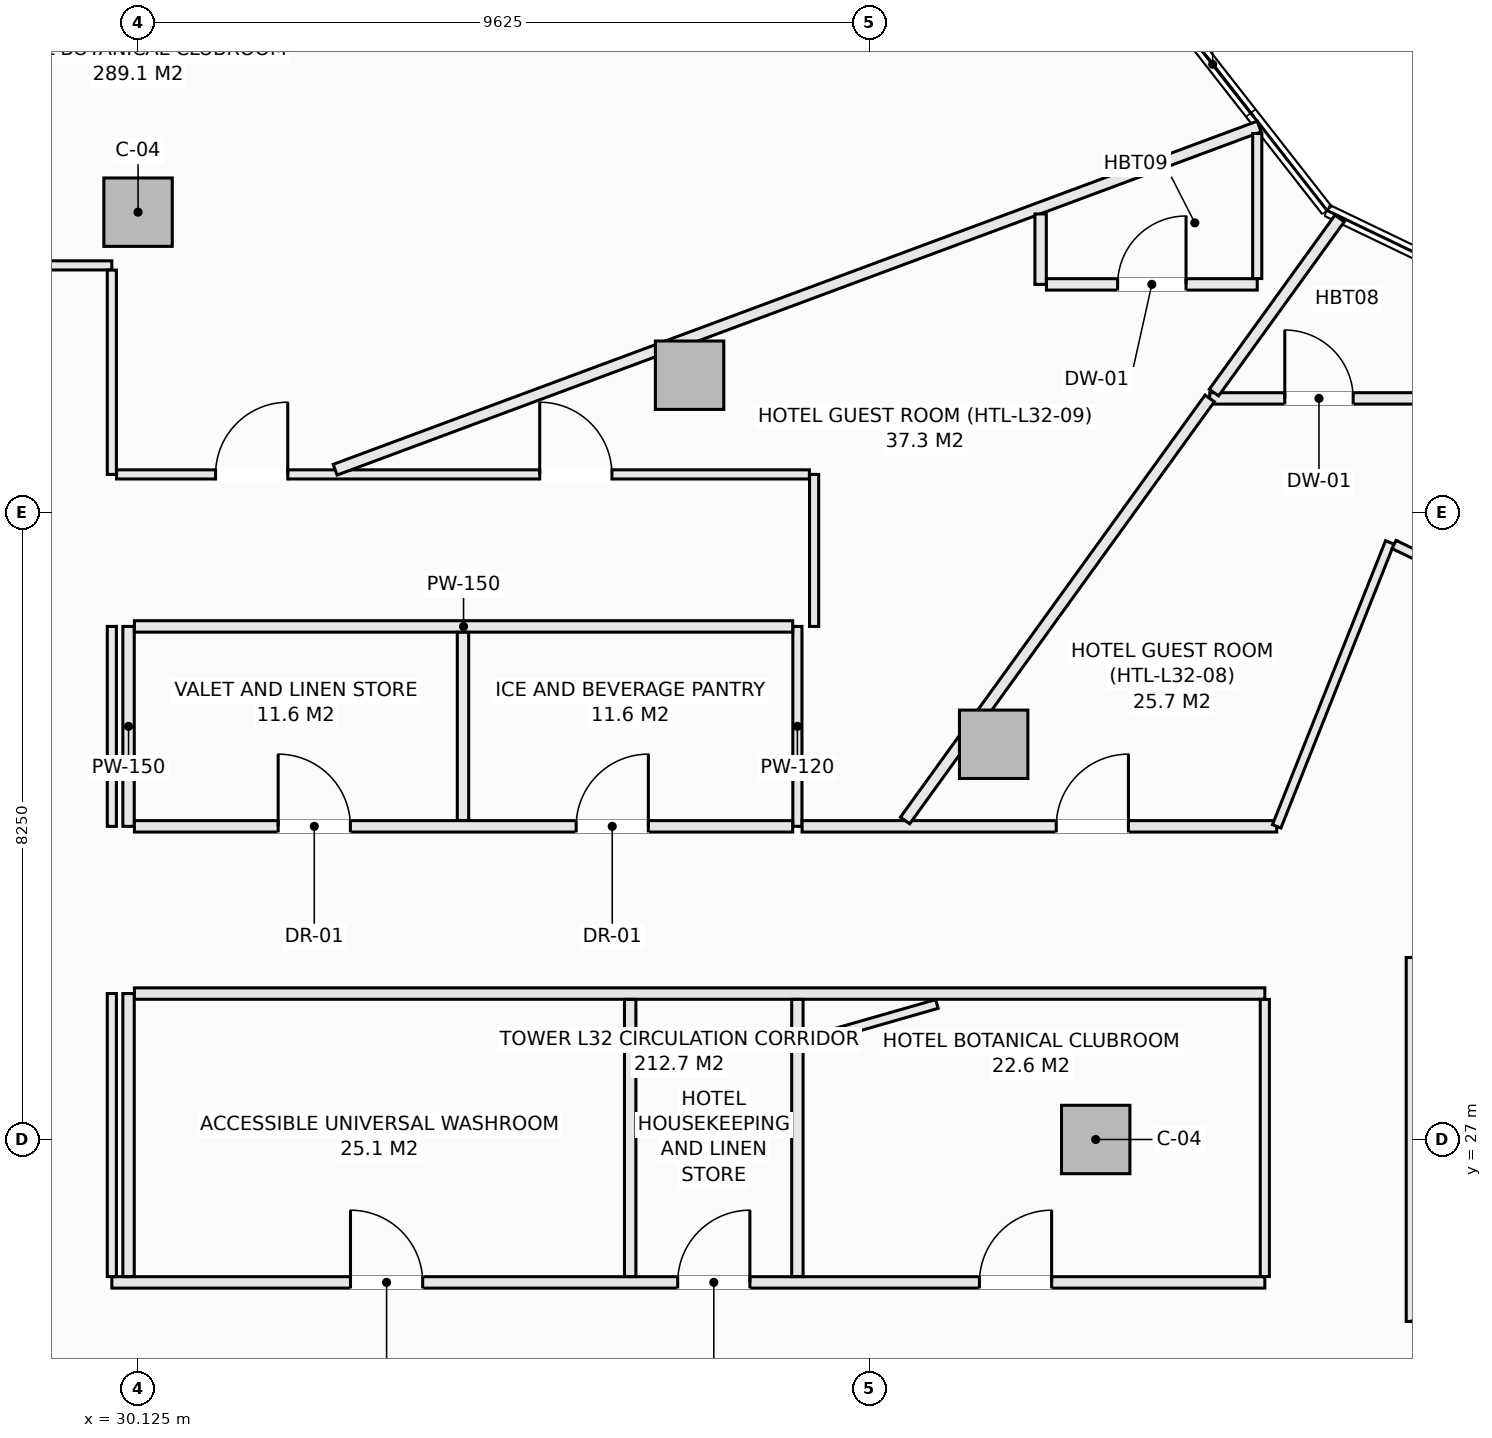
"""IFC4 building model, lengths in metres.
Left out: names, types, materials, properties, quantities, classifications, styles, units other than length and angle.
Written with IfcOpenShell. Run it as: python <this file> out.ifc"""

import sys

from ifc_helpers import new_model, si_unit, direction, frame, frame_2d, origin, origin_2d, place, context, subcontext, project, spatial, rectangle, extrude, element, fill, save


model = new_model("IFC4")
c1 = context("Model", 3, precision=1e-05, world=origin(), true_north=direction((0.0, 1.0)))
c2 = subcontext(c1, "Body", "Model", "MODEL_VIEW")
j1 = project(units=[si_unit("LENGTHUNIT", "METRE"), si_unit("PLANEANGLEUNIT", "RADIAN")], contexts=[c1])
p1 = place(None, origin())
s1 = spatial("IfcSite", under=j1, at=p1, CompositionType="ELEMENT")
p2 = place(p1, origin())
s2 = spatial("IfcBuilding", under=s1, at=p2, CompositionType="ELEMENT")
p3 = place(p2, frame((0.0, 0.0, 129.1)))
s3 = spatial("IfcBuildingStorey", under=s2, at=p3, CompositionType="ELEMENT", Elevation=129.1)
for number, where, z_axis, x_axis in (
    (1, (42.725, 27.0, -0.27), (0.0, 0.0, 1.0), (1.0, 0.0, 0.0)),
    (2, (41.382, 32.199, -0.27), (0.0, 0.0, 1.0), (1.0, 0.0, 0.0)),
    (3, (37.382, 37.055, -0.27), (0.0, 0.0, 1.0), (1.0, 0.0, 0.0)),
    (4, (30.125, 39.2, -0.27), (0.0, 0.0, 1.0), (1.0, 0.0, 0.0)),
):
    element("IfcColumn", number, at=place(p3, frame(where, z_axis=z_axis, x_axis=x_axis)), inside=s3, PredefinedType="COLUMN", context=c2, shape_type="SweptSolid", body=[
        extrude(rectangle(XDim=0.9, YDim=0.9, at=origin_2d()), origin(), (0.0, 0.0, 1.0), 3.4),
    ])
p4 = place(p3, frame((29.78, 25.12, 0.0), z_axis=(0.0, 0.0, 1.0), x_axis=(1.0, 0.0, 0.0)))
e5 = element("IfcWall", 5, at=p4, inside=s3, PredefinedType="PARTITIONING", context=c2, shape_type="SweptSolid", body=[
    extrude(rectangle(XDim=15.17, YDim=0.15, at=frame_2d((7.585, 0.0))), origin(), (0.0, 0.0, 1.0), 3.13),
])
p5 = place(p4, frame((3.14, 0.0, 0.0)))
e6 = element("IfcOpeningElement", 6, at=p5, cuts=e5, PredefinedType="OPENING", context=c2, shape_type="SweptSolid", body=[
    extrude(rectangle(XDim=0.95, YDim=2.1, at=frame_2d((0.475, 1.05))), frame((0.0, 0.085, 0.0), z_axis=(0.0, -1.0, 0.0), x_axis=(1.0, 0.0, 0.0)), (0.0, 0.0, 1.0), 0.17),
])
p6 = place(p4, frame((7.445, 0.0, 0.0)))
e7 = element("IfcOpeningElement", 7, at=p6, cuts=e5, PredefinedType="OPENING", context=c2, shape_type="SweptSolid", body=[
    extrude(rectangle(XDim=0.95, YDim=2.1, at=frame_2d((0.475, 1.05))), frame((0.0, 0.085, 0.0), z_axis=(0.0, -1.0, 0.0), x_axis=(1.0, 0.0, 0.0)), (0.0, 0.0, 1.0), 0.17),
])
p7 = place(p4, frame((11.415, 0.0, 0.0)))
e8 = element("IfcOpeningElement", 8, at=p7, cuts=e5, PredefinedType="OPENING", context=c2, shape_type="SweptSolid", body=[
    extrude(rectangle(XDim=0.95, YDim=2.1, at=frame_2d((0.475, 1.05))), frame((0.0, 0.085, 0.0), z_axis=(0.0, -1.0, 0.0), x_axis=(1.0, 0.0, 0.0)), (0.0, 0.0, 1.0), 0.17),
])
p8 = place(p3, frame((30.0, 25.197, 0.0), z_axis=(0.0, 0.0, 1.0), x_axis=(0.0, 1.0, 0.0)))
e9 = element("IfcWall", 9, at=p8, inside=s3, PredefinedType="PARTITIONING", context=c2, shape_type="SweptSolid", body=[
    extrude(rectangle(XDim=3.723, YDim=0.15, at=frame_2d((1.861, 0.0))), origin(), (0.0, 0.0, 1.0), 3.13),
])
p9 = place(p3, frame((30.0, 31.12, 0.0), z_axis=(0.0, 0.0, 1.0), x_axis=(0.0, 1.0, 0.0)))
e10 = element("IfcWall", 10, at=p9, inside=s3, PredefinedType="PARTITIONING", context=c2, shape_type="SweptSolid", body=[
    extrude(rectangle(XDim=2.63, YDim=0.15, at=frame_2d((1.315, 0.0))), origin(), (0.0, 0.0, 1.0), 3.13),
])
p10 = place(p3, frame((30.077, 28.92, 0.0), z_axis=(0.0, 0.0, 1.0), x_axis=(1.0, 0.0, 0.0)))
e11 = element("IfcWall", 11, at=p10, inside=s3, PredefinedType="PARTITIONING", context=c2, shape_type="SweptSolid", body=[
    extrude(rectangle(XDim=14.873, YDim=0.15, at=frame_2d((7.437, 0.0))), origin(), (0.0, 0.0, 1.0), 3.13),
])
for number, where, z_axis, x_axis in (
    (12, (36.6, 25.197, 0.0), (0.0, 0.0, 1.0), (0.0, 1.0, 0.0)),
    (13, (38.8, 25.197, 0.0), (0.0, 0.0, 1.0), (0.0, 1.0, 0.0)),
):
    element("IfcWall", number, at=place(p3, frame(where, z_axis=z_axis, x_axis=x_axis)), inside=s3, PredefinedType="PARTITIONING", context=c2, shape_type="SweptSolid", body=[
        extrude(rectangle(XDim=3.646, YDim=0.15, at=frame_2d((1.823, 0.0))), origin(), (0.0, 0.0, 1.0), 3.13),
    ])
p11 = place(p3, frame((38.8, 31.12, 0.0), z_axis=(0.0, 0.0, 1.0), x_axis=(0.0, 1.0, 0.0)))
e14 = element("IfcWall", 14, at=p11, inside=s3, PredefinedType="PARTITIONING", context=c2, shape_type="SweptSolid", body=[
    extrude(rectangle(XDim=2.63, YDim=0.12, at=frame_2d((1.315, 0.0))), origin(), (0.0, 0.0, 1.0), 3.13),
])
p12 = place(p3, frame((30.077, 31.12, 0.0), z_axis=(0.0, 0.0, 1.0), x_axis=(1.0, 0.0, 0.0)))
e15 = element("IfcWall", 15, at=p12, inside=s3, PredefinedType="PARTITIONING", context=c2, shape_type="SweptSolid", body=[
    extrude(rectangle(XDim=8.661, YDim=0.15, at=frame_2d((4.331, 0.0))), origin(), (0.0, 0.0, 1.0), 3.13),
])
p13 = place(p12, frame((1.892, 0.0, 0.0)))
e16 = element("IfcOpeningElement", 16, at=p13, cuts=e15, PredefinedType="OPENING", context=c2, shape_type="SweptSolid", body=[
    extrude(rectangle(XDim=0.95, YDim=2.1, at=frame_2d((0.475, 1.05))), frame((0.0, 0.085, 0.0), z_axis=(0.0, -1.0, 0.0), x_axis=(1.0, 0.0, 0.0)), (0.0, 0.0, 1.0), 0.17),
])
p14 = place(p12, frame((5.812, 0.0, 0.0)))
e17 = element("IfcOpeningElement", 17, at=p14, cuts=e15, PredefinedType="OPENING", context=c2, shape_type="SweptSolid", body=[
    extrude(rectangle(XDim=0.95, YDim=2.1, at=frame_2d((0.475, 1.05))), frame((0.0, 0.085, 0.0), z_axis=(0.0, -1.0, 0.0), x_axis=(1.0, 0.0, 0.0)), (0.0, 0.0, 1.0), 0.17),
])
p15 = place(p3, frame((38.862, 31.12, 0.0), z_axis=(0.0, 0.0, 1.0), x_axis=(1.0, 0.0, 0.0)))
e18 = element("IfcWall", 18, at=p15, inside=s3, PredefinedType="PARTITIONING", context=c2, shape_type="SweptSolid", body=[
    extrude(rectangle(XDim=6.244, YDim=0.15, at=frame_2d((3.122, 0.0))), origin(), (0.0, 0.0, 1.0), 3.13),
])
p16 = place(p15, frame((3.344, 0.0, 0.0)))
e19 = element("IfcOpeningElement", 19, at=p16, cuts=e18, PredefinedType="OPENING", context=c2, shape_type="SweptSolid", body=[
    extrude(rectangle(XDim=0.95, YDim=2.1, at=frame_2d((0.475, 1.05))), frame((0.0, 0.085, 0.0), z_axis=(0.0, -1.0, 0.0), x_axis=(1.0, 0.0, 0.0)), (0.0, 0.0, 1.0), 0.17),
])
p17 = place(p3, frame((30.077, 33.75, 0.0), z_axis=(0.0, 0.0, 1.0), x_axis=(1.0, 0.0, 0.0)))
e20 = element("IfcWall", 20, at=p17, inside=s3, PredefinedType="PARTITIONING", context=c2, shape_type="SweptSolid", body=[
    extrude(rectangle(XDim=8.661, YDim=0.15, at=frame_2d((4.331, 0.0))), origin(), (0.0, 0.0, 1.0), 3.13),
])
p18 = place(p3, frame((34.4, 31.197, 0.0), z_axis=(0.0, 0.0, 1.0), x_axis=(0.0, 1.0, 0.0)))
e21 = element("IfcWall", 21, at=p18, inside=s3, PredefinedType="PARTITIONING", context=c2, shape_type="SweptSolid", body=[
    extrude(rectangle(XDim=2.476, YDim=0.15, at=frame_2d((1.238, 0.0))), origin(), (0.0, 0.0, 1.0), 3.13),
])
p19 = place(p3, frame((39.02, 33.75, 0.0), z_axis=(0.0, 0.0, 1.0), x_axis=(0.0, 1.0, 0.0)))
e22 = element("IfcWall", 22, at=p19, inside=s3, PredefinedType="PARTITIONING", context=c2, shape_type="SweptSolid", body=[
    extrude(rectangle(XDim=2.0, YDim=0.12, at=frame_2d((1.0, 0.0))), origin(), (0.0, 0.0, 1.0), 3.13),
])
p20 = place(p3, frame((27.25, 38.5, 0.0), z_axis=(0.0, 0.0, 1.0), x_axis=(1.0, 0.0, 0.0)))
e23 = element("IfcWall", 23, at=p20, inside=s3, PredefinedType="PARTITIONING", context=c2, shape_type="SweptSolid", body=[
    extrude(rectangle(XDim=2.53, YDim=0.12, at=frame_2d((1.265, 0.0))), origin(), (0.0, 0.0, 1.0), 3.13),
])
p21 = place(p3, frame((29.78, 25.197, 0.0), z_axis=(0.0, 0.0, 1.0), x_axis=(0.0, 1.0, 0.0)))
e24 = element("IfcWall", 24, at=p21, inside=s3, PredefinedType="PARTITIONING", context=c2, shape_type="SweptSolid", body=[
    extrude(rectangle(XDim=3.723, YDim=0.12, at=frame_2d((1.861, 0.0))), origin(), (0.0, 0.0, 1.0), 3.13),
])
p22 = place(p3, frame((29.78, 31.12, 0.0), z_axis=(0.0, 0.0, 1.0), x_axis=(0.0, 1.0, 0.0)))
e25 = element("IfcWall", 25, at=p22, inside=s3, PredefinedType="PARTITIONING", context=c2, shape_type="SweptSolid", body=[
    extrude(rectangle(XDim=2.63, YDim=0.12, at=frame_2d((1.315, 0.0))), origin(), (0.0, 0.0, 1.0), 3.13),
])
p23 = place(p3, frame((29.78, 35.75, 0.0), z_axis=(0.0, 0.0, 1.0), x_axis=(0.0, 1.0, 0.0)))
e26 = element("IfcWall", 26, at=p23, inside=s3, PredefinedType="PARTITIONING", context=c2, shape_type="SweptSolid", body=[
    extrude(rectangle(XDim=2.688, YDim=0.12, at=frame_2d((1.344, 0.0))), origin(), (0.0, 0.0, 1.0), 3.13),
])
p24 = place(p3, frame((29.842, 35.75, 0.0), z_axis=(0.0, 0.0, 1.0), x_axis=(1.0, 0.0, 0.0)))
e27 = element("IfcWall", 27, at=p24, inside=s3, PredefinedType="PARTITIONING", context=c2, shape_type="SweptSolid", body=[
    extrude(rectangle(XDim=9.116, YDim=0.12, at=frame_2d((4.558, 0.0))), origin(), (0.0, 0.0, 1.0), 2.505),
])
p25 = place(p24, frame((5.568, 0.0, 0.0)))
e28 = element("IfcOpeningElement", 28, at=p25, cuts=e27, PredefinedType="OPENING", context=c2, shape_type="SweptSolid", body=[
    extrude(rectangle(XDim=0.95, YDim=2.1, at=frame_2d((0.475, 1.05))), frame((0.0, 0.07, 0.0), z_axis=(0.0, -1.0, 0.0), x_axis=(1.0, 0.0, 0.0)), (0.0, 0.0, 1.0), 0.14),
])
p26 = place(p24, frame((1.302, 0.0, 0.0)))
e29 = element("IfcOpeningElement", 29, at=p26, cuts=e27, PredefinedType="OPENING", context=c2, shape_type="SweptSolid", body=[
    extrude(rectangle(XDim=0.95, YDim=2.1, at=frame_2d((0.475, 1.05))), frame((0.0, 0.07, 0.0), z_axis=(0.0, -1.0, 0.0), x_axis=(1.0, 0.0, 0.0)), (0.0, 0.0, 1.0), 0.14),
])
p27 = place(p3, frame((45.106, 31.12, 0.0), z_axis=(0.0, 0.0, 1.0), x_axis=(0.370123465787, 0.928982572535, 0.0)))
e30 = element("IfcWall", 30, at=p27, inside=s3, PredefinedType="PARTITIONING", context=c2, shape_type="SweptSolid", body=[
    extrude(rectangle(XDim=4.02, YDim=0.12, at=frame_2d((2.01, 0.0))), origin(), (0.0, 0.0, 1.0), 3.13),
])
p28 = place(p3, frame((46.65, 34.828, 0.0), z_axis=(0.0, 0.0, 1.0), x_axis=(0.901271525254, -0.433254703109, 0.0)))
e31 = element("IfcWall", 31, at=p28, inside=s3, PredefinedType="PARTITIONING", context=c2, shape_type="SweptSolid", body=[
    extrude(rectangle(XDim=2.304, YDim=0.12, at=frame_2d((1.152, 0.0))), origin(), (0.0, 0.0, 1.0), 3.13),
])
p29 = place(p3, frame((46.946, 29.363, 0.0), z_axis=(0.0, 0.0, 1.0), x_axis=(0.370173596818, 0.928962597858, 0.0)))
e32 = element("IfcWall", 32, at=p29, inside=s3, PredefinedType="PARTITIONING", context=c2, shape_type="SweptSolid", body=[
    extrude(rectangle(XDim=4.809, YDim=0.12, at=frame_2d((2.404, 0.0))), origin(), (0.0, 0.0, 1.0), 3.13),
])
p30 = place(p29, frame((2.788, 0.0, 0.0)))
e33 = element("IfcOpeningElement", 33, at=p30, cuts=e32, PredefinedType="OPENING", context=c2, shape_type="SweptSolid", body=[
    extrude(rectangle(XDim=0.95, YDim=2.1, at=frame_2d((0.475, 1.05))), frame((0.0, 0.07, 0.0), z_axis=(0.0, -1.0, 0.0), x_axis=(1.0, 0.0, 0.0)), (0.0, 0.0, 1.0), 0.14),
])
p31 = place(p3, frame((46.87, 24.606, 0.0), z_axis=(0.0, 0.0, 1.0), x_axis=(0.0, 1.0, 0.0)))
e34 = element("IfcWall", 34, at=p31, inside=s3, PredefinedType="PARTITIONING", context=c2, shape_type="SweptSolid", body=[
    extrude(rectangle(XDim=4.788, YDim=0.12, at=frame_2d((2.394, 0.0))), origin(), (0.0, 0.0, 1.0), 3.13),
])
p32 = place(p3, frame((46.946, 24.637, 0.0), z_axis=(0.0, 0.0, 1.0), x_axis=(0.370173596818, -0.928962597858, 0.0)))
e35 = element("IfcWall", 35, at=p32, inside=s3, PredefinedType="PARTITIONING", context=c2, shape_type="SweptSolid", body=[
    extrude(rectangle(XDim=4.809, YDim=0.12, at=frame_2d((2.404, 0.0))), origin(), (0.0, 0.0, 1.0), 3.13),
])
p33 = place(p3, frame((44.95, 25.197, 0.0), z_axis=(0.0, 0.0, 1.0), x_axis=(0.0, 1.0, 0.0)))
e36 = element("IfcWall", 36, at=p33, inside=s3, PredefinedType="PARTITIONING", context=c2, shape_type="SweptSolid", body=[
    extrude(rectangle(XDim=3.646, YDim=0.12, at=frame_2d((1.823, 0.0))), origin(), (0.0, 0.0, 1.0), 3.13),
])
p34 = place(p3, frame((38.877, 28.279, 0.0), z_axis=(0.0, 0.0, 1.0), x_axis=(0.96129187977, 0.275532070524, 0.0)))
e37 = element("IfcWall", 37, at=p34, inside=s3, PredefinedType="PARTITIONING", context=c2, shape_type="SweptSolid", body=[
    extrude(rectangle(XDim=1.829, YDim=0.12, at=frame_2d((0.915, 0.0))), origin(), (0.0, 0.0, 1.0), 3.13),
])
p35 = place(p3, frame((44.225, 36.75, 0.0), z_axis=(0.0, 0.0, 1.0), x_axis=(1.0, 0.0, 0.0)))
e38 = element("IfcWall", 38, at=p35, inside=s3, PredefinedType="PARTITIONING", context=c2, shape_type="SweptSolid", body=[
    extrude(rectangle(XDim=2.875, YDim=0.15, at=frame_2d((1.438, 0.0))), origin(), (0.0, 0.0, 1.0), 3.13),
])
p36 = place(p35, frame((0.988, 0.0, 0.0)))
e39 = element("IfcOpeningElement", 39, at=p36, cuts=e38, PredefinedType="OPENING", context=c2, shape_type="SweptSolid", body=[
    extrude(rectangle(XDim=0.9, YDim=2.1, at=frame_2d((0.45, 1.05))), frame((0.0, 0.085, 0.0), z_axis=(0.0, -1.0, 0.0), x_axis=(1.0, 0.0, 0.0)), (0.0, 0.0, 1.0), 0.17),
])
p37 = place(p3, frame((40.217, 31.197, 0.0), z_axis=(0.0, 0.0, 1.0), x_axis=(0.585304416837, 0.810813628173, 0.0)))
e40 = element("IfcWall", 40, at=p37, inside=s3, PredefinedType="PARTITIONING", context=c2, shape_type="SweptSolid", body=[
    extrude(rectangle(XDim=6.849, YDim=0.15, at=frame_2d((3.424, 0.0))), origin(), (0.0, 0.0, 1.0), 3.13),
])
p38 = place(p3, frame((44.281, 36.827, 0.0), z_axis=(0.0, 0.0, 1.0), x_axis=(0.585301255108, 0.81081591053, 0.0)))
e41 = element("IfcWall", 41, at=p38, inside=s3, PredefinedType="PARTITIONING", context=c2, shape_type="SweptSolid", body=[
    extrude(rectangle(XDim=2.826, YDim=0.15, at=frame_2d((1.413, 0.0))), origin(), (0.0, 0.0, 1.0), 3.13),
])
p39 = place(p3, frame((32.718, 35.812, 0.0), z_axis=(0.0, 0.0, 1.0), x_axis=(0.937443879907, 0.348136427317, 0.0)))
e42 = element("IfcWall", 42, at=p39, inside=s3, PredefinedType="PARTITIONING", context=c2, shape_type="SweptSolid", body=[
    extrude(rectangle(XDim=12.969, YDim=0.15, at=frame_2d((6.484, 0.0))), origin(), (0.0, 0.0, 1.0), 2.505),
])
p40 = place(p3, frame((42.0, 38.25, 0.0), z_axis=(0.0, 0.0, 1.0), x_axis=(0.0, 1.0, 0.0)))
e43 = element("IfcWall", 43, at=p40, inside=s3, PredefinedType="PARTITIONING", context=c2, shape_type="SweptSolid", body=[
    extrude(rectangle(XDim=0.927, YDim=0.15, at=frame_2d((0.463, 0.0))), origin(), (0.0, 0.0, 1.0), 3.13),
])
p41 = place(p3, frame((42.077, 38.25, 0.0), z_axis=(0.0, 0.0, 1.0), x_axis=(1.0, 0.0, 0.0)))
e44 = element("IfcWall", 44, at=p41, inside=s3, PredefinedType="PARTITIONING", context=c2, shape_type="SweptSolid", body=[
    extrude(rectangle(XDim=2.773, YDim=0.15, at=frame_2d((1.387, 0.0))), origin(), (0.0, 0.0, 1.0), 2.812),
])
p42 = place(p41, frame((0.937, 0.0, 0.0)))
e45 = element("IfcOpeningElement", 45, at=p42, cuts=e44, PredefinedType="OPENING", context=c2, shape_type="SweptSolid", body=[
    extrude(rectangle(XDim=0.9, YDim=2.1, at=frame_2d((0.45, 1.05))), frame((0.0, 0.085, 0.0), z_axis=(0.0, -1.0, 0.0), x_axis=(1.0, 0.0, 0.0)), (0.0, 0.0, 1.0), 0.17),
])
p43 = place(p3, frame((44.85, 38.327, 0.0), z_axis=(0.0, 0.0, 1.0), x_axis=(0.0, 1.0, 0.0)))
e46 = element("IfcWall", 46, at=p43, inside=s3, PredefinedType="PARTITIONING", context=c2, shape_type="SweptSolid", body=[
    extrude(rectangle(XDim=1.908, YDim=0.12, at=frame_2d((0.954, 0.0))), origin(), (0.0, 0.0, 1.0), 3.13),
])
p44 = place(p5, origin())
e47 = element("IfcDoor", 47, at=p44, inside=s3, OperationType="SINGLE_SWING_LEFT", PredefinedType="DOOR", context=c2, shape_type="SweptSolid", body=[
    extrude(rectangle(XDim=0.95, YDim=2.1, at=frame_2d((0.475, 1.05))), frame((0.0, 0.025, 0.0), z_axis=(0.0, -1.0, 0.0), x_axis=(1.0, 0.0, 0.0)), (0.0, 0.0, 1.0), 0.05),
])
fill(e6, e47)
p45 = place(p6, origin())
e48 = element("IfcDoor", 48, at=p45, inside=s3, OperationType="SINGLE_SWING_RIGHT", PredefinedType="DOOR", context=c2, shape_type="SweptSolid", body=[
    extrude(rectangle(XDim=0.95, YDim=2.1, at=frame_2d((0.475, 1.05))), frame((0.0, 0.025, 0.0), z_axis=(0.0, -1.0, 0.0), x_axis=(1.0, 0.0, 0.0)), (0.0, 0.0, 1.0), 0.05),
])
fill(e7, e48)
p46 = place(p13, origin())
e49 = element("IfcDoor", 49, at=p46, inside=s3, OperationType="SINGLE_SWING_LEFT", PredefinedType="DOOR", context=c2, shape_type="SweptSolid", body=[
    extrude(rectangle(XDim=0.95, YDim=2.1, at=frame_2d((0.475, 1.05))), frame((0.0, 0.025, 0.0), z_axis=(0.0, -1.0, 0.0), x_axis=(1.0, 0.0, 0.0)), (0.0, 0.0, 1.0), 0.05),
])
fill(e16, e49)
p47 = place(p14, origin())
e50 = element("IfcDoor", 50, at=p47, inside=s3, OperationType="SINGLE_SWING_RIGHT", PredefinedType="DOOR", context=c2, shape_type="SweptSolid", body=[
    extrude(rectangle(XDim=0.95, YDim=2.1, at=frame_2d((0.475, 1.05))), frame((0.0, 0.025, 0.0), z_axis=(0.0, -1.0, 0.0), x_axis=(1.0, 0.0, 0.0)), (0.0, 0.0, 1.0), 0.05),
])
fill(e17, e50)
p48 = place(p7, origin())
e51 = element("IfcDoor", 51, at=p48, inside=s3, OperationType="SINGLE_SWING_RIGHT", PredefinedType="DOOR", context=c2, shape_type="SweptSolid", body=[
    extrude(rectangle(XDim=0.95, YDim=2.1, at=frame_2d((0.475, 1.05))), frame((0.0, 0.025, 0.0), z_axis=(0.0, -1.0, 0.0), x_axis=(1.0, 0.0, 0.0)), (0.0, 0.0, 1.0), 0.05),
])
fill(e8, e51)
p49 = place(p16, origin())
e52 = element("IfcDoor", 52, at=p49, inside=s3, OperationType="SINGLE_SWING_RIGHT", PredefinedType="DOOR", context=c2, shape_type="SweptSolid", body=[
    extrude(rectangle(XDim=0.95, YDim=2.1, at=frame_2d((0.475, 1.05))), frame((0.0, 0.025, 0.0), z_axis=(0.0, -1.0, 0.0), x_axis=(1.0, 0.0, 0.0)), (0.0, 0.0, 1.0), 0.05),
])
fill(e19, e52)
p50 = place(p25, origin())
e53 = element("IfcDoor", 53, at=p50, inside=s3, OperationType="SINGLE_SWING_LEFT", PredefinedType="DOOR", context=c2, shape_type="SweptSolid", body=[
    extrude(rectangle(XDim=0.95, YDim=2.1, at=frame_2d((0.475, 1.05))), frame((0.0, 0.025, 0.0), z_axis=(0.0, -1.0, 0.0), x_axis=(1.0, 0.0, 0.0)), (0.0, 0.0, 1.0), 0.05),
])
fill(e28, e53)
p51 = place(p26, origin())
e54 = element("IfcDoor", 54, at=p51, inside=s3, OperationType="SINGLE_SWING_RIGHT", PredefinedType="DOOR", context=c2, shape_type="SweptSolid", body=[
    extrude(rectangle(XDim=0.95, YDim=2.1, at=frame_2d((0.475, 1.05))), frame((0.0, 0.025, 0.0), z_axis=(0.0, -1.0, 0.0), x_axis=(1.0, 0.0, 0.0)), (0.0, 0.0, 1.0), 0.05),
])
fill(e29, e54)
p52 = place(p36, origin())
e55 = element("IfcDoor", 55, at=p52, inside=s3, OperationType="SINGLE_SWING_LEFT", PredefinedType="DOOR", context=c2, shape_type="SweptSolid", body=[
    extrude(rectangle(XDim=0.9, YDim=2.1, at=frame_2d((0.45, 1.05))), frame((0.0, 0.025, 0.0), z_axis=(0.0, -1.0, 0.0), x_axis=(1.0, 0.0, 0.0)), (0.0, 0.0, 1.0), 0.05),
])
fill(e39, e55)
p53 = place(p42, origin())
e56 = element("IfcDoor", 56, at=p53, inside=s3, OperationType="SINGLE_SWING_RIGHT", PredefinedType="DOOR", context=c2, shape_type="SweptSolid", body=[
    extrude(rectangle(XDim=0.9, YDim=2.1, at=frame_2d((0.45, 1.05))), frame((0.0, 0.025, 0.0), z_axis=(0.0, -1.0, 0.0), x_axis=(1.0, 0.0, 0.0)), (0.0, 0.0, 1.0), 0.05),
])
fill(e45, e56)
save(model, sys.argv[1])
